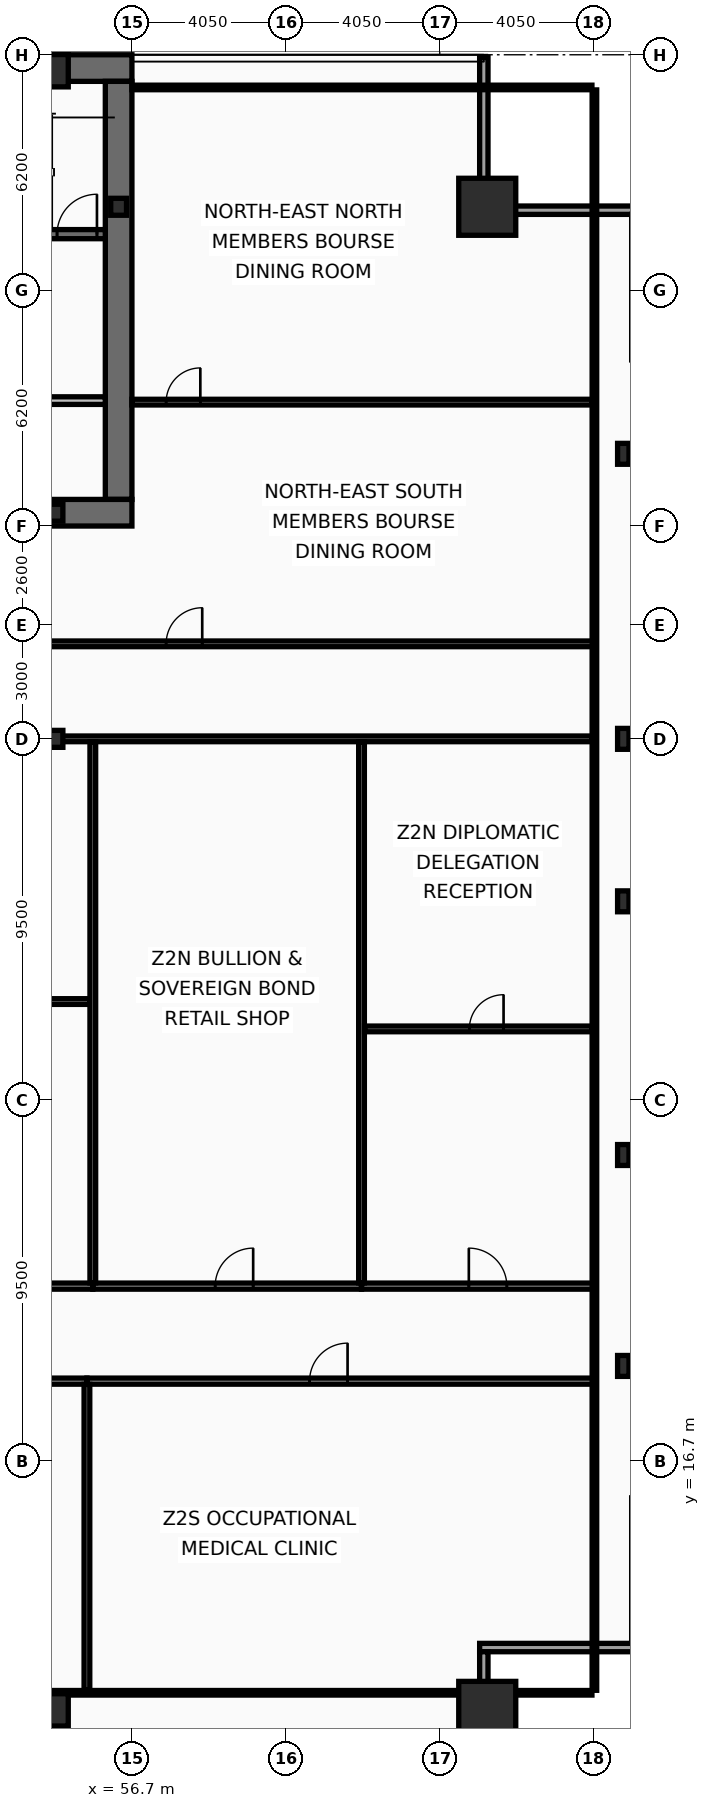
"""IFC4 building model, lengths in metres.
Left out: names, types, materials, properties, quantities, classifications, styles, units other than length and angle.
Written with IfcOpenShell. Run it as: python <this file> out.ifc"""

import sys

from ifc_helpers import new_model, si_unit, direction, frame, frame_2d, origin, origin_2d, place, context, subcontext, project, spatial, rectangle, hollow_rectangle, i_section, extrude, element, fill, save


model = new_model("IFC4")
c1 = context("Model", 3, precision=1e-05, world=origin(), true_north=direction((0.0, 1.0)))
c2 = subcontext(c1, "Body", "Model", "MODEL_VIEW")
j1 = project(units=[si_unit("LENGTHUNIT", "METRE"), si_unit("PLANEANGLEUNIT", "RADIAN")], contexts=[c1])
p1 = place(None, origin())
s1 = spatial("IfcSite", under=j1, at=p1, CompositionType="ELEMENT")
p2 = place(p1, origin())
s2 = spatial("IfcBuilding", under=s1, at=p2, CompositionType="ELEMENT")
p3 = place(p2, frame((0.0, 0.0, 111.0)))
s3 = spatial("IfcBuildingStorey", under=s2, at=p3, CompositionType="ELEMENT", Elevation=111.0)
p4 = place(p3, frame((16.2, 53.35, 0.0), z_axis=(0.0, 0.0, 1.0), x_axis=(1.0, 0.0, 0.0)))
e1 = element("IfcWall", 1, at=p4, inside=s3, PredefinedType="SHEAR", context=c2, shape_type="SweptSolid", body=[
    extrude(rectangle(XDim=40.5, YDim=0.7, at=frame_2d((20.25, 0.0))), origin(), (0.0, 0.0, 1.0), 3.44),
])
p5 = place(p3, frame((56.35, 53.0, 0.0), z_axis=(0.0, 0.0, 1.0), x_axis=(0.0, -1.0, 0.0)))
e2 = element("IfcWall", 2, at=p5, inside=s3, PredefinedType="SHEAR", context=c2, shape_type="SweptSolid", body=[
    extrude(rectangle(XDim=11.0, YDim=0.7, at=frame_2d((5.5, 0.0))), origin(), (0.0, 0.0, 1.0), 3.44),
])
p6 = place(p3, frame((56.7, 41.65, 0.0), z_axis=(0.0, 0.0, 1.0), x_axis=(-1.0, 0.0, 0.0)))
e3 = element("IfcWall", 3, at=p6, inside=s3, PredefinedType="SHEAR", context=c2, shape_type="SweptSolid", body=[
    extrude(rectangle(XDim=2.45, YDim=0.7, at=frame_2d((1.225, 0.0))), origin(), (0.0, 0.0, 1.0), 3.44),
])
p7 = place(p3, frame((48.63, 48.98, 0.0), z_axis=(0.0, 0.0, 1.0), x_axis=(1.0, 0.0, 0.0)))
e4 = element("IfcWall", 4, at=p7, inside=s3, PredefinedType="SHEAR", context=c2, shape_type="SweptSolid", body=[
    extrude(rectangle(XDim=7.37, YDim=0.24, at=frame_2d((3.685, 0.0))), origin(), (0.0, 0.0, 1.0), 3.44),
])
p8 = place(p7, frame((6.1, 0.0, 0.0)))
e5 = element("IfcOpeningElement", 5, at=p8, cuts=e4, PredefinedType="OPENING", context=c2, shape_type="SweptSolid", body=[
    extrude(rectangle(XDim=1.05, YDim=2.15, at=frame_2d((0.525, 1.075))), frame((0.0, 0.13, 0.0), z_axis=(0.0, -1.0, 0.0), x_axis=(1.0, 0.0, 0.0)), (0.0, 0.0, 1.0), 0.26),
])
for number, where, z_axis, x_axis in (
    (6, (66.05, 10.15, 0.0), (0.0, 0.0, 1.0), (1.0, 0.0, 0.0)),
    (7, (66.05, 49.7, 0.0), (0.0, 0.0, 1.0), (1.0, 0.0, 0.0)),
):
    element("IfcColumn", number, at=place(p3, frame(where, z_axis=z_axis, x_axis=x_axis)), inside=s3, PredefinedType="COLUMN", context=c2, shape_type="SweptSolid", body=[
        extrude(hollow_rectangle(XDim=1.5, YDim=1.5, WallThickness=0.07, at=origin_2d()), origin(), (0.0, 0.0, 1.0), 3.6),
    ])
for number, where, z_axis, x_axis in (
    (8, (54.675, 10.15, 0.0), (0.0, 0.0, 1.0), (1.0, 0.0, 0.0)),
    (9, (54.675, 53.28, 0.0), (0.0, 0.0, 1.0), (1.0, 0.0, 0.0)),
):
    element("IfcColumn", number, at=place(p3, frame(where, z_axis=z_axis, x_axis=x_axis)), inside=s3, PredefinedType="COLUMN", context=c2, shape_type="SweptSolid", body=[
        extrude(hollow_rectangle(XDim=0.7, YDim=0.85, WallThickness=0.05, at=origin_2d()), origin(), (0.0, 0.0, 1.0), 3.6),
    ])
for number, where, z_axis, x_axis in (
    (10, (69.63, 19.2, 0.0), (0.0, 0.0, 1.0), (1.0, 0.0, 0.0)),
    (11, (69.63, 24.75, 0.0), (0.0, 0.0, 1.0), (1.0, 0.0, 0.0)),
    (12, (69.63, 31.425, 0.0), (0.0, 0.0, 1.0), (1.0, 0.0, 0.0)),
    (13, (69.63, 35.7, 0.0), (0.0, 0.0, 1.0), (1.0, 0.0, 0.0)),
    (14, (69.63, 43.2, 0.0), (0.0, 0.0, 1.0), (1.0, 0.0, 0.0)),
):
    element("IfcColumn", number, at=place(p3, frame(where, z_axis=z_axis, x_axis=x_axis)), inside=s3, PredefinedType="COLUMN", context=c2, shape_type="SweptSolid", body=[
        extrude(i_section(OverallWidth=0.3, OverallDepth=0.55, WebThickness=0.015, FlangeThickness=0.029, at=origin_2d()), origin(), (0.0, 0.0, 1.0), 3.6),
    ])
for number, where, z_axis, x_axis in (
    (15, (56.35, 49.7, 0.0), (0.0, 0.0, 1.0), (1.0, 0.0, 0.0)),
    (16, (54.675, 35.7, 0.0), (0.0, 0.0, 1.0), (1.0, 0.0, 0.0)),
    (17, (54.675, 41.65, 0.0), (0.0, 0.0, 1.0), (1.0, 0.0, 0.0)),
):
    element("IfcColumn", number, at=place(p3, frame(where, z_axis=z_axis, x_axis=x_axis)), inside=s3, PredefinedType="COLUMN", context=c2, shape_type="SweptSolid", body=[
        extrude(i_section(OverallWidth=0.416, OverallDepth=0.446, WebThickness=0.039, FlangeThickness=0.063, at=origin_2d()), origin(), (0.0, 0.0, 1.0), 3.6),
    ])
p9 = place(p3, frame((65.96, 53.63, 0.0), z_axis=(0.0, 0.0, 1.0), x_axis=(0.0, -1.0, 0.0)))
e18 = element("IfcWall", 18, at=p9, inside=s3, PredefinedType="SOLIDWALL", context=c2, shape_type="SweptSolid", body=[
    extrude(rectangle(XDim=3.91, YDim=0.22, at=frame_2d((1.955, 0.0))), origin(), (0.0, 0.0, 1.0), 2.83),
])
for number, where, z_axis, x_axis in (
    (19, (65.85, 49.61, 0.0), (0.0, 0.0, 1.0), (1.0, 0.0, 0.0)),
    (20, (70.07, 11.79, 0.0), (0.0, 0.0, 1.0), (-1.0, 0.0, 0.0)),
):
    element("IfcWall", number, at=place(p3, frame(where, z_axis=z_axis, x_axis=x_axis)), inside=s3, PredefinedType="SOLIDWALL", context=c2, shape_type="SweptSolid", body=[
        extrude(rectangle(XDim=4.22, YDim=0.22, at=frame_2d((2.11, 0.0))), origin(), (0.0, 0.0, 1.0), 2.83),
    ])
p10 = place(p3, frame((65.96, 11.68, 0.0), z_axis=(0.0, 0.0, 1.0), x_axis=(0.0, -1.0, 0.0)))
e21 = element("IfcWall", 21, at=p10, inside=s3, PredefinedType="SOLIDWALL", context=c2, shape_type="SweptSolid", body=[
    extrude(rectangle(XDim=3.91, YDim=0.22, at=frame_2d((1.955, 0.0))), origin(), (0.0, 0.0, 1.0), 2.83),
])
p11 = place(p3, frame((51.9, 44.6, 0.0), z_axis=(0.0, 0.0, 1.0), x_axis=(1.0, 0.0, 0.0)))
e22 = element("IfcWall", 22, at=p11, inside=s3, PredefinedType="PARTITIONING", context=c2, shape_type="SweptSolid", body=[
    extrude(rectangle(XDim=4.1, YDim=0.2, at=frame_2d((2.05, 0.0))), origin(), (0.0, 0.0, 1.0), 3.44),
])
p12 = place(p11, frame((1.15, 0.0, 0.0)))
e23 = element("IfcOpeningElement", 23, at=p12, cuts=e22, PredefinedType="OPENING", context=c2, shape_type="SweptSolid", body=[
    extrude(rectangle(XDim=1.05, YDim=2.15, at=frame_2d((0.525, 1.075))), frame((0.0, 0.11, 0.0), z_axis=(0.0, -1.0, 0.0), x_axis=(1.0, 0.0, 0.0)), (0.0, 0.0, 1.0), 0.22),
])
p13 = place(p3, frame((54.35, 38.2, 0.0), z_axis=(0.0, 0.0, 1.0), x_axis=(1.0, 0.0, 0.0)))
e24 = element("IfcWall", 24, at=p13, inside=s3, PredefinedType="PARTITIONING", context=c2, shape_type="SweptSolid", body=[
    extrude(rectangle(XDim=14.52, YDim=0.15, at=frame_2d((7.26, 0.0))), origin(), (0.0, 0.0, 1.0), 2.73),
])
p14 = place(p13, frame((3.25, 0.0, 0.0)))
e25 = element("IfcOpeningElement", 25, at=p14, cuts=e24, PredefinedType="OPENING", context=c2, shape_type="SweptSolid", body=[
    extrude(rectangle(XDim=0.95, YDim=2.05, at=frame_2d((0.475, 1.025))), frame((0.0, 0.085, 0.0), z_axis=(0.0, -1.0, 0.0), x_axis=(1.0, 0.0, 0.0)), (0.0, 0.0, 1.0), 0.17),
])
p15 = place(p3, frame((56.7, 44.56, 0.0), z_axis=(0.0, 0.0, 1.0), x_axis=(1.0, 0.0, 0.0)))
e26 = element("IfcWall", 26, at=p15, inside=s3, PredefinedType="PARTITIONING", context=c2, shape_type="SweptSolid", body=[
    extrude(rectangle(XDim=12.105, YDim=0.15, at=frame_2d((6.052, 0.0))), origin(), (0.0, 0.0, 1.0), 2.83),
])
p16 = place(p15, frame((0.9, 0.0, 0.0)))
e27 = element("IfcOpeningElement", 27, at=p16, cuts=e26, PredefinedType="OPENING", context=c2, shape_type="SweptSolid", body=[
    extrude(rectangle(XDim=0.9, YDim=2.05, at=frame_2d((0.45, 1.025))), frame((0.0, 0.085, 0.0), z_axis=(0.0, -1.0, 0.0), x_axis=(1.0, 0.0, 0.0)), (0.0, 0.0, 1.0), 0.17),
])
p17 = place(p3, frame((42.136, 18.8, 0.0), z_axis=(0.0, 0.0, 1.0), x_axis=(1.0, 0.0, 0.0)))
e28 = element("IfcWall", 28, at=p17, inside=s3, PredefinedType="PARTITIONING", context=c2, shape_type="SweptSolid", body=[
    extrude(rectangle(XDim=13.38, YDim=0.16, at=frame_2d((6.69, 0.0))), origin(), (0.0, 0.0, 1.0), 2.73),
])
p18 = place(p17, frame((5.87, 0.0, 0.0)))
e29 = element("IfcOpeningElement", 29, at=p18, cuts=e28, PredefinedType="OPENING", context=c2, shape_type="SweptSolid", body=[
    extrude(rectangle(XDim=1.0, YDim=2.05, at=frame_2d((0.5, 1.025))), frame((0.0, 0.09, 0.0), z_axis=(0.0, -1.0, 0.0), x_axis=(1.0, 0.0, 0.0)), (0.0, 0.0, 1.0), 0.18),
])
p19 = place(p3, frame((55.516, 18.8, 0.0), z_axis=(0.0, 0.0, 1.0), x_axis=(1.0, 0.0, 0.0)))
e30 = element("IfcWall", 30, at=p19, inside=s3, PredefinedType="PARTITIONING", context=c2, shape_type="SweptSolid", body=[
    extrude(rectangle(XDim=13.354, YDim=0.16, at=frame_2d((6.677, 0.0))), origin(), (0.0, 0.0, 1.0), 2.73),
])
p20 = place(p19, frame((5.859, 0.0, 0.0)))
e31 = element("IfcOpeningElement", 31, at=p20, cuts=e30, PredefinedType="OPENING", context=c2, shape_type="SweptSolid", body=[
    extrude(rectangle(XDim=1.0, YDim=2.05, at=frame_2d((0.5, 1.025))), frame((0.0, 0.09, 0.0), z_axis=(0.0, -1.0, 0.0), x_axis=(1.0, 0.0, 0.0)), (0.0, 0.0, 1.0), 0.18),
])
p21 = place(p3, frame((55.516, 10.665, 0.0), z_axis=(0.0, 0.0, 1.0), x_axis=(0.0, 1.0, 0.0)))
e32 = element("IfcWall", 32, at=p21, inside=s3, PredefinedType="PARTITIONING", context=c2, shape_type="SweptSolid", body=[
    extrude(rectangle(XDim=8.05, YDim=0.15, at=frame_2d((4.025, 0.0))), origin(), (0.0, 0.0, 1.0), 3.44),
])
p22 = place(p3, frame((21.81, 35.7, 0.0), z_axis=(0.0, 0.0, 1.0), x_axis=(1.0, 0.0, 0.0)))
e33 = element("IfcWall", 33, at=p22, inside=s3, PredefinedType="PARTITIONING", context=c2, shape_type="SweptSolid", body=[
    extrude(rectangle(XDim=46.995, YDim=0.15, at=frame_2d((23.498, 0.0))), origin(), (0.0, 0.0, 1.0), 2.73),
])
p23 = place(p3, frame((49.071, 21.3, 0.0), z_axis=(0.0, 0.0, 1.0), x_axis=(1.0, 0.0, 0.0)))
e34 = element("IfcWall", 34, at=p23, inside=s3, PredefinedType="PARTITIONING", context=c2, shape_type="SweptSolid", body=[
    extrude(rectangle(XDim=6.6, YDim=0.16, at=frame_2d((3.3, 0.0))), origin(), (0.0, 0.0, 1.0), 2.73),
])
p24 = place(p23, frame((3.022, 0.0, 0.0)))
e35 = element("IfcOpeningElement", 35, at=p24, cuts=e34, PredefinedType="OPENING", context=c2, shape_type="SweptSolid", body=[
    extrude(rectangle(XDim=1.0, YDim=2.05, at=frame_2d((0.5, 1.025))), frame((0.0, 0.09, 0.0), z_axis=(0.0, -1.0, 0.0), x_axis=(1.0, 0.0, 0.0)), (0.0, 0.0, 1.0), 0.18),
])
p25 = place(p3, frame((49.151, 28.788, 0.0), z_axis=(0.0, 0.0, 1.0), x_axis=(1.0, 0.0, 0.0)))
e36 = element("IfcWall", 36, at=p25, inside=s3, PredefinedType="PARTITIONING", context=c2, shape_type="SweptSolid", body=[
    extrude(rectangle(XDim=6.44, YDim=0.15, at=frame_2d((3.22, 0.0))), origin(), (0.0, 0.0, 1.0), 2.73),
])
p26 = place(p25, frame((2.97, 0.0, 0.0)))
e37 = element("IfcOpeningElement", 37, at=p26, cuts=e36, PredefinedType="OPENING", context=c2, shape_type="SweptSolid", body=[
    extrude(rectangle(XDim=0.9, YDim=2.05, at=frame_2d((0.45, 1.025))), frame((0.0, 0.085, 0.0), z_axis=(0.0, -1.0, 0.0), x_axis=(1.0, 0.0, 0.0)), (0.0, 0.0, 1.0), 0.17),
])
p27 = place(p3, frame((55.671, 21.3, 0.0), z_axis=(0.0, 0.0, 1.0), x_axis=(1.0, 0.0, 0.0)))
e38 = element("IfcWall", 38, at=p27, inside=s3, PredefinedType="PARTITIONING", context=c2, shape_type="SweptSolid", body=[
    extrude(rectangle(XDim=7.071, YDim=0.16, at=frame_2d((3.535, 0.0))), origin(), (0.0, 0.0, 1.0), 3.44),
])
p28 = place(p27, frame((3.22, 0.0, 0.0)))
e39 = element("IfcOpeningElement", 39, at=p28, cuts=e38, PredefinedType="OPENING", context=c2, shape_type="SweptSolid", body=[
    extrude(rectangle(XDim=1.0, YDim=2.05, at=frame_2d((0.5, 1.025))), frame((0.0, 0.09, 0.0), z_axis=(0.0, -1.0, 0.0), x_axis=(1.0, 0.0, 0.0)), (0.0, 0.0, 1.0), 0.18),
])
p29 = place(p3, frame((55.671, 21.385, 0.0), z_axis=(0.0, 0.0, 1.0), x_axis=(0.0, 1.0, 0.0)))
e40 = element("IfcWall", 40, at=p29, inside=s3, PredefinedType="PARTITIONING", context=c2, shape_type="SweptSolid", body=[
    extrude(rectangle(XDim=14.235, YDim=0.15, at=frame_2d((7.118, 0.0))), origin(), (0.0, 0.0, 1.0), 2.73),
])
p30 = place(p3, frame((62.742, 21.3, 0.0), z_axis=(0.0, 0.0, 1.0), x_axis=(1.0, 0.0, 0.0)))
e41 = element("IfcWall", 41, at=p30, inside=s3, PredefinedType="PARTITIONING", context=c2, shape_type="SweptSolid", body=[
    extrude(rectangle(XDim=6.128, YDim=0.16, at=frame_2d((3.064, 0.0))), origin(), (0.0, 0.0, 1.0), 3.44),
])
p31 = place(p30, frame((2.824, 0.0, 0.0)))
e42 = element("IfcOpeningElement", 42, at=p31, cuts=e41, PredefinedType="OPENING", context=c2, shape_type="SweptSolid", body=[
    extrude(rectangle(XDim=1.0, YDim=2.05, at=frame_2d((0.5, 1.025))), frame((0.0, 0.09, 0.0), z_axis=(0.0, -1.0, 0.0), x_axis=(1.0, 0.0, 0.0)), (0.0, 0.0, 1.0), 0.18),
])
p32 = place(p3, frame((62.742, 21.385, 0.0), z_axis=(0.0, 0.0, 1.0), x_axis=(0.0, 1.0, 0.0)))
e43 = element("IfcWall", 43, at=p32, inside=s3, PredefinedType="PARTITIONING", context=c2, shape_type="SweptSolid", body=[
    extrude(rectangle(XDim=14.235, YDim=0.15, at=frame_2d((7.118, 0.0))), origin(), (0.0, 0.0, 1.0), 2.73),
])
p33 = place(p3, frame((62.822, 28.068, 0.0), z_axis=(0.0, 0.0, 1.0), x_axis=(1.0, 0.0, 0.0)))
e44 = element("IfcWall", 44, at=p33, inside=s3, PredefinedType="PARTITIONING", context=c2, shape_type="SweptSolid", body=[
    extrude(rectangle(XDim=5.983, YDim=0.15, at=frame_2d((2.992, 0.0))), origin(), (0.0, 0.0, 1.0), 3.44),
])
p34 = place(p33, frame((2.758, 0.0, 0.0)))
e45 = element("IfcOpeningElement", 45, at=p34, cuts=e44, PredefinedType="OPENING", context=c2, shape_type="SweptSolid", body=[
    extrude(rectangle(XDim=0.9, YDim=2.05, at=frame_2d((0.45, 1.025))), frame((0.0, 0.085, 0.0), z_axis=(0.0, -1.0, 0.0), x_axis=(1.0, 0.0, 0.0)), (0.0, 0.0, 1.0), 0.17),
])
p35 = place(p3, frame((68.87, 10.665, 0.0), z_axis=(0.0, 0.0, 1.0), x_axis=(0.0, 1.0, 0.0)))
e46 = element("IfcWall", 46, at=p35, inside=s3, PredefinedType="PARTITIONING", context=c2, shape_type="SweptSolid", body=[
    extrude(rectangle(XDim=42.11, YDim=0.12, at=frame_2d((21.055, 0.0))), origin(), (0.0, 0.0, 1.0), 2.73),
])
p36 = place(p3, frame((56.7, 52.84, 0.0), z_axis=(0.0, 0.0, 1.0), x_axis=(1.0, 0.0, 0.0)))
e47 = element("IfcWall", 47, at=p36, inside=s3, PredefinedType="PARTITIONING", context=c2, shape_type="SweptSolid", body=[
    extrude(rectangle(XDim=12.105, YDim=0.12, at=frame_2d((6.052, 0.0))), origin(), (0.0, 0.0, 1.0), 3.44),
])
p37 = place(p3, frame((4.095, 10.6, 0.0), z_axis=(0.0, 0.0, 1.0), x_axis=(1.0, 0.0, 0.0)))
e48 = element("IfcWall", 48, at=p37, inside=s3, PredefinedType="PARTITIONING", context=c2, shape_type="SweptSolid", body=[
    extrude(rectangle(XDim=64.71, YDim=0.12, at=frame_2d((32.355, 0.0))), origin(), (0.0, 0.0, 1.0), 2.73),
])
p38 = place(p8, origin())
e49 = element("IfcDoor", 49, at=p38, inside=s3, OperationType="SINGLE_SWING_RIGHT", PredefinedType="DOOR", context=c2, shape_type="SweptSolid", body=[
    extrude(rectangle(XDim=1.05, YDim=2.15, at=frame_2d((0.525, 1.075))), frame((0.0, 0.025, 0.0), z_axis=(0.0, -1.0, 0.0), x_axis=(1.0, 0.0, 0.0)), (0.0, 0.0, 1.0), 0.05),
])
fill(e5, e49)
p39 = place(p14, origin())
e50 = element("IfcDoor", 50, at=p39, inside=s3, OperationType="SINGLE_SWING_RIGHT", PredefinedType="DOOR", context=c2, shape_type="SweptSolid", body=[
    extrude(rectangle(XDim=0.95, YDim=2.05, at=frame_2d((0.475, 1.025))), frame((0.0, 0.025, 0.0), z_axis=(0.0, -1.0, 0.0), x_axis=(1.0, 0.0, 0.0)), (0.0, 0.0, 1.0), 0.05),
])
fill(e25, e50)
p40 = place(p16, origin())
e51 = element("IfcDoor", 51, at=p40, inside=s3, OperationType="SINGLE_SWING_RIGHT", PredefinedType="DOOR", context=c2, shape_type="SweptSolid", body=[
    extrude(rectangle(XDim=0.9, YDim=2.05, at=frame_2d((0.45, 1.025))), frame((0.0, 0.025, 0.0), z_axis=(0.0, -1.0, 0.0), x_axis=(1.0, 0.0, 0.0)), (0.0, 0.0, 1.0), 0.05),
])
fill(e27, e51)
p41 = place(p20, origin())
e52 = element("IfcDoor", 52, at=p41, inside=s3, OperationType="SINGLE_SWING_RIGHT", PredefinedType="DOOR", context=c2, shape_type="SweptSolid", body=[
    extrude(rectangle(XDim=1.0, YDim=2.05, at=frame_2d((0.5, 1.025))), frame((0.0, 0.025, 0.0), z_axis=(0.0, -1.0, 0.0), x_axis=(1.0, 0.0, 0.0)), (0.0, 0.0, 1.0), 0.05),
])
fill(e31, e52)
p42 = place(p28, origin())
e53 = element("IfcDoor", 53, at=p42, inside=s3, OperationType="SINGLE_SWING_RIGHT", PredefinedType="DOOR", context=c2, shape_type="SweptSolid", body=[
    extrude(rectangle(XDim=1.0, YDim=2.05, at=frame_2d((0.5, 1.025))), frame((0.0, 0.025, 0.0), z_axis=(0.0, -1.0, 0.0), x_axis=(1.0, 0.0, 0.0)), (0.0, 0.0, 1.0), 0.05),
])
fill(e39, e53)
p43 = place(p31, origin())
e54 = element("IfcDoor", 54, at=p43, inside=s3, OperationType="SINGLE_SWING_LEFT", PredefinedType="DOOR", context=c2, shape_type="SweptSolid", body=[
    extrude(rectangle(XDim=1.0, YDim=2.05, at=frame_2d((0.5, 1.025))), frame((0.0, 0.025, 0.0), z_axis=(0.0, -1.0, 0.0), x_axis=(1.0, 0.0, 0.0)), (0.0, 0.0, 1.0), 0.05),
])
fill(e42, e54)
p44 = place(p34, origin())
e55 = element("IfcDoor", 55, at=p44, inside=s3, OperationType="SINGLE_SWING_RIGHT", PredefinedType="DOOR", context=c2, shape_type="SweptSolid", body=[
    extrude(rectangle(XDim=0.9, YDim=2.05, at=frame_2d((0.45, 1.025))), frame((0.0, 0.025, 0.0), z_axis=(0.0, -1.0, 0.0), x_axis=(1.0, 0.0, 0.0)), (0.0, 0.0, 1.0), 0.05),
])
fill(e45, e55)
save(model, sys.argv[1])
